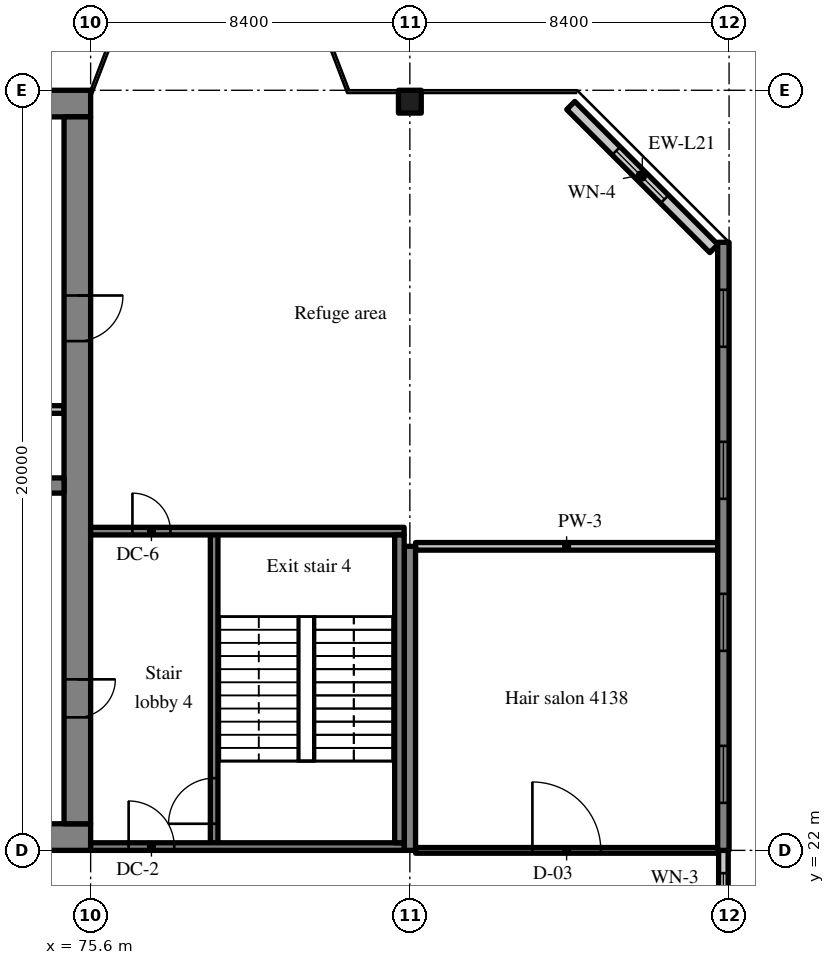
"""IFC4 building model, lengths in metres.
Left out: names, types, materials, properties, quantities, classifications, styles, units other than length and angle.
Written with IfcOpenShell. Run it as: python <this file> out.ifc"""

import sys

from ifc_helpers import new_model, si_unit, direction, frame, frame_2d, origin, origin_2d, place, context, subcontext, project, spatial, rectangle, extrude, source, transform, mapped, element, fill, save


model = new_model("IFC4")
c1 = context("Model", 3, precision=1e-05, world=origin(), true_north=direction((0.0, 1.0)))
c2 = subcontext(c1, "Body", "Model", "MODEL_VIEW")
j1 = project(units=[si_unit("LENGTHUNIT", "METRE"), si_unit("PLANEANGLEUNIT", "RADIAN")], contexts=[c1])
p1 = place(None, origin())
s1 = spatial("IfcSite", under=j1, at=p1, CompositionType="ELEMENT")
p2 = place(p1, origin())
s2 = spatial("IfcBuilding", under=s1, at=p2, CompositionType="ELEMENT")
p3 = place(p2, frame((0.0, 0.0, 170.6)))
s3 = spatial("IfcBuildingStorey", under=s2, at=p3, CompositionType="ELEMENT", Elevation=170.6)
m1 = source(origin(), c2, "Body", "SweptSolid", [
    extrude(rectangle(XDim=50.4, YDim=0.7, at=frame_2d((25.2, 0.0))), origin(), (0.0, 0.0, 1.0), 3.52),
])
p4 = place(p3, frame((25.2, 22.35, 0.0), z_axis=(0.0, 0.0, 1.0), x_axis=(1.0, 0.0, 0.0)))
e1 = element("IfcWall", 1, at=p4, inside=s3, PredefinedType="SHEAR", context=c2, shape_type="MappedRepresentation", body=[
    mapped(m1, transform((0.0, 0.0, 0.0), scale=1.0)),
])
m2 = source(origin(), c2, "Body", "SweptSolid", [
    extrude(rectangle(XDim=1.8, YDim=2.1, at=frame_2d((0.9, 1.05))), frame((0.0, 0.36, 0.0), z_axis=(0.0, -1.0, 0.0), x_axis=(1.0, 0.0, 0.0)), (0.0, 0.0, 1.0), 0.72),
])
p5 = place(p4, frame((15.9, 0.0, 0.0)))
e2 = element("IfcOpeningElement", 2, at=p5, cuts=e1, PredefinedType="OPENING", context=c2, shape_type="MappedRepresentation", body=[
    mapped(m2, transform((0.0, 0.0, 0.0), scale=1.0)),
])
m3 = source(origin(), c2, "Body", "SweptSolid", [
    extrude(rectangle(XDim=0.9, YDim=2.1, at=frame_2d((0.45, 1.05))), frame((0.0, 0.36, 0.0), z_axis=(0.0, -1.0, 0.0), x_axis=(1.0, 0.0, 0.0)), (0.0, 0.0, 1.0), 0.72),
])
p6 = place(p4, frame((9.7, 0.0, 0.0)))
e3 = element("IfcOpeningElement", 3, at=p6, cuts=e1, PredefinedType="OPENING", context=c2, shape_type="MappedRepresentation", body=[
    mapped(m3, transform((0.0, 0.0, 0.0), scale=1.0)),
])
p7 = place(p4, frame((21.5, 0.0, 0.0)))
e4 = element("IfcOpeningElement", 4, at=p7, cuts=e1, PredefinedType="OPENING", context=c2, shape_type="MappedRepresentation", body=[
    mapped(m3, transform((0.0, 0.0, 0.0), scale=1.0)),
])
p8 = place(p4, frame((32.7, 0.0, 0.0)))
e5 = element("IfcOpeningElement", 5, at=p8, cuts=e1, PredefinedType="OPENING", context=c2, shape_type="MappedRepresentation", body=[
    mapped(m2, transform((0.0, 0.0, 0.0), scale=1.0)),
])
m4 = source(origin(), c2, "Body", "SweptSolid", [
    extrude(rectangle(XDim=1.2, YDim=2.1, at=frame_2d((0.6, 1.05))), frame((0.0, 0.36, 0.0), z_axis=(0.0, -1.0, 0.0), x_axis=(1.0, 0.0, 0.0)), (0.0, 0.0, 1.0), 0.72),
])
p9 = place(p4, frame((6.475, 0.0, 0.0)))
e6 = element("IfcOpeningElement", 6, at=p9, cuts=e1, PredefinedType="OPENING", context=c2, shape_type="MappedRepresentation", body=[
    mapped(m4, transform((0.0, 0.0, 0.0), scale=1.0)),
])
p10 = place(p4, frame((47.875, 0.0, 0.0)))
e7 = element("IfcOpeningElement", 7, at=p10, cuts=e1, PredefinedType="OPENING", context=c2, shape_type="MappedRepresentation", body=[
    mapped(m4, transform((0.0, 0.0, 0.0), scale=1.0)),
])
p11 = place(p3, frame((25.2, 41.65, 0.0), z_axis=(0.0, 0.0, 1.0), x_axis=(1.0, 0.0, 0.0)))
e8 = element("IfcWall", 8, at=p11, inside=s3, PredefinedType="SHEAR", context=c2, shape_type="MappedRepresentation", body=[
    mapped(m1, transform((0.0, 0.0, 0.0), scale=1.0)),
])
m5 = source(origin(), c2, "Body", "SweptSolid", [
    extrude(rectangle(XDim=18.6, YDim=0.7, at=frame_2d((9.3, 0.0))), origin(), (0.0, 0.0, 1.0), 3.52),
])
p12 = place(p3, frame((75.25, 22.7, 0.0), z_axis=(0.0, 0.0, 1.0), x_axis=(0.0, 1.0, 0.0)))
e9 = element("IfcWall", 9, at=p12, inside=s3, PredefinedType="SHEAR", context=c2, shape_type="MappedRepresentation", body=[
    mapped(m5, transform((0.0, 0.0, 0.0), scale=1.0)),
])
m6 = source(origin(), c2, "Body", "SweptSolid", [
    extrude(rectangle(XDim=1.0, YDim=2.1, at=frame_2d((0.5, 1.05))), frame((0.0, 0.36, 0.0), z_axis=(0.0, -1.0, 0.0), x_axis=(1.0, 0.0, 0.0)), (0.0, 0.0, 1.0), 0.72),
])
p13 = place(p12, frame((2.8, 0.0, 0.0)))
e10 = element("IfcOpeningElement", 10, at=p13, cuts=e9, PredefinedType="OPENING", context=c2, shape_type="MappedRepresentation", body=[
    mapped(m6, transform((0.0, 0.0, 0.0), scale=1.0)),
])
p14 = place(p12, frame((12.7, 0.0, 0.0)))
e11 = element("IfcOpeningElement", 11, at=p14, cuts=e9, PredefinedType="OPENING", context=c2, shape_type="MappedRepresentation", body=[
    mapped(m4, transform((0.0, 0.0, 0.0), scale=1.0)),
])
m7 = source(origin(), c2, "Body", "SweptSolid", [
    extrude(rectangle(XDim=7.5, YDim=0.4, at=frame_2d((3.75, 0.0))), origin(), (0.0, 0.0, 1.0), 3.52),
])
p15 = place(p3, frame((67.4, 31.6, 0.0), z_axis=(0.0, 0.0, 1.0), x_axis=(1.0, 0.0, 0.0)))
e12 = element("IfcWall", 12, at=p15, inside=s3, PredefinedType="SHEAR", context=c2, shape_type="MappedRepresentation", body=[
    mapped(m7, transform((0.0, 0.0, 0.0), scale=1.0)),
])
m8 = source(origin(), c2, "Body", "SweptSolid", [
    extrude(rectangle(XDim=1.1, YDim=2.1, at=frame_2d((0.55, 1.05))), frame((0.0, 0.21, 0.0), z_axis=(0.0, -1.0, 0.0), x_axis=(1.0, 0.0, 0.0)), (0.0, 0.0, 1.0), 0.42),
])
p16 = place(p15, frame((5.725, 0.0, 0.0)))
e13 = element("IfcOpeningElement", 13, at=p16, cuts=e12, PredefinedType="OPENING", context=c2, shape_type="MappedRepresentation", body=[
    mapped(m8, transform((0.0, 0.0, 0.0), scale=1.0)),
])
m9 = source(origin(), c2, "Body", "SweptSolid", [
    extrude(rectangle(XDim=8.0, YDim=0.3, at=frame_2d((4.0, 0.0))), origin(), (0.0, 0.0, 1.0), 3.52),
])
p17 = place(p3, frame((84.0, 22.0, 0.0), z_axis=(0.0, 0.0, 1.0), x_axis=(0.0, 1.0, 0.0)))
e14 = element("IfcWall", 14, at=p17, inside=s3, PredefinedType="SHEAR", context=c2, shape_type="MappedRepresentation", body=[
    mapped(m9, transform((0.0, 0.0, 0.0), scale=1.0)),
])
m10 = source(origin(), c2, "Body", "SweptSolid", [
    extrude(rectangle(XDim=16.0, YDim=0.3, at=frame_2d((8.0, 0.0))), origin(), (0.0, 0.0, 1.0), 3.52),
])
p18 = place(p3, frame((92.25, 22.0, 0.0), z_axis=(0.0, 0.0, 1.0), x_axis=(0.0, 1.0, 0.0)))
e15 = element("IfcWall", 15, at=p18, inside=s3, PredefinedType="SHEAR", context=c2, shape_type="MappedRepresentation", body=[
    mapped(m10, transform((0.0, 0.0, 0.0), scale=1.0)),
])
m11 = source(origin(), c2, "Body", "SweptSolid", [
    extrude(rectangle(XDim=1.5, YDim=1.5, at=frame_2d((0.75, 0.75))), frame((0.0, 0.16, 0.0), z_axis=(0.0, -1.0, 0.0), x_axis=(1.0, 0.0, 0.0)), (0.0, 0.0, 1.0), 0.32),
])
p19 = place(p18, frame((1.25, 0.0, 0.9)))
e16 = element("IfcOpeningElement", 16, at=p19, cuts=e15, PredefinedType="OPENING", context=c2, shape_type="MappedRepresentation", body=[
    mapped(m11, transform((0.0, 0.0, 0.0), scale=1.0)),
])
p20 = place(p18, frame((5.25, 0.0, 0.9)))
e17 = element("IfcOpeningElement", 17, at=p20, cuts=e15, PredefinedType="OPENING", context=c2, shape_type="MappedRepresentation", body=[
    mapped(m11, transform((0.0, 0.0, 0.0), scale=1.0)),
])
p21 = place(p18, frame((9.25, 0.0, 0.9)))
e18 = element("IfcOpeningElement", 18, at=p21, cuts=e15, PredefinedType="OPENING", context=c2, shape_type="MappedRepresentation", body=[
    mapped(m11, transform((0.0, 0.0, 0.0), scale=1.0)),
])
p22 = place(p18, frame((13.25, 0.0, 0.9)))
e19 = element("IfcOpeningElement", 19, at=p22, cuts=e15, PredefinedType="OPENING", context=c2, shape_type="MappedRepresentation", body=[
    mapped(m11, transform((0.0, 0.0, 0.0), scale=1.0)),
])
m12 = source(origin(), c2, "Body", "SweptSolid", [
    extrude(rectangle(XDim=0.6, YDim=0.6, at=origin_2d()), origin(), (0.0, 0.0, 1.0), 3.52),
])
p23 = place(p3, frame((84.0, 41.7, 0.0), z_axis=(0.0, 0.0, 1.0), x_axis=(1.0, 0.0, 0.0)))
e20 = element("IfcColumn", 20, at=p23, inside=s3, PredefinedType="COLUMN", context=c2, shape_type="MappedRepresentation", body=[
    mapped(m12, transform((0.0, 0.0, 0.0), scale=1.0)),
])
m13 = source(origin(), c2, "Body", "SweptSolid", [
    extrude(rectangle(XDim=5.326, YDim=0.3, at=frame_2d((2.663, 0.0))), origin(), (0.0, 0.0, 1.0), 3.52),
])
p24 = place(p3, frame((92.0, 37.834, 0.0), z_axis=(0.0, 0.0, 1.0), x_axis=(-0.707083859269, 0.707129702361, 0.0)))
e21 = element("IfcWall", 21, at=p24, inside=s3, PredefinedType="SOLIDWALL", context=c2, shape_type="MappedRepresentation", body=[
    mapped(m13, transform((0.0, 0.0, 0.0), scale=1.0)),
])
m14 = source(origin(), c2, "Body", "SweptSolid", [
    extrude(rectangle(XDim=1.8, YDim=1.5, at=frame_2d((0.9, 0.75))), frame((0.0, 0.16, 0.0), z_axis=(0.0, -1.0, 0.0), x_axis=(1.0, 0.0, 0.0)), (0.0, 0.0, 1.0), 0.32),
])
p25 = place(p24, frame((1.836, 0.0, 0.9)))
e22 = element("IfcOpeningElement", 22, at=p25, cuts=e21, PredefinedType="OPENING", context=c2, shape_type="MappedRepresentation", body=[
    mapped(m14, transform((0.0, 0.0, 0.0), scale=1.0)),
])
m15 = source(origin(), c2, "Body", "SweptSolid", [
    extrude(rectangle(XDim=2.4, YDim=0.25, at=frame_2d((1.2, 0.0))), origin(), (0.0, 0.0, 1.0), 2.62),
])
p26 = place(p3, frame((92.25, 19.6, 0.0), z_axis=(0.0, 0.0, 1.0), x_axis=(0.0, 1.0, 0.0)))
e23 = element("IfcWall", 23, at=p26, inside=s3, PredefinedType="SOLIDWALL", context=c2, shape_type="MappedRepresentation", body=[
    mapped(m15, transform((0.0, 0.0, 0.0), scale=1.0)),
])
m16 = source(origin(), c2, "Body", "SweptSolid", [
    extrude(rectangle(XDim=1.2, YDim=1.5, at=frame_2d((0.6, 0.75))), frame((0.0, 0.135, 0.0), z_axis=(0.0, -1.0, 0.0), x_axis=(1.0, 0.0, 0.0)), (0.0, 0.0, 1.0), 0.27),
])
p27 = place(p26, frame((0.6, 0.0, 0.9)))
e24 = element("IfcOpeningElement", 24, at=p27, cuts=e23, PredefinedType="OPENING", context=c2, shape_type="MappedRepresentation", body=[
    mapped(m16, transform((0.0, 0.0, 0.0), scale=1.0)),
])
m17 = source(origin(), c2, "Body", "SweptSolid", [
    extrude(rectangle(XDim=2.45, YDim=0.2, at=frame_2d((1.225, 0.0))), origin(), (0.0, 0.0, 1.0), 3.52),
])
p28 = place(p3, frame((72.45, 33.6, 0.0), z_axis=(0.0, 0.0, 1.0), x_axis=(1.0, 0.0, 0.0)))
e25 = element("IfcWall", 25, at=p28, inside=s3, PredefinedType="SOLIDWALL", context=c2, shape_type="MappedRepresentation", body=[
    mapped(m17, transform((0.0, 0.0, 0.0), scale=1.0)),
])
m18 = source(origin(), c2, "Body", "SweptSolid", [
    extrude(rectangle(XDim=8.3, YDim=0.2, at=frame_2d((4.15, 0.0))), origin(), (0.0, 0.0, 1.0), 3.52),
])
p29 = place(p3, frame((78.85, 22.1, 0.0), z_axis=(0.0, 0.0, 1.0), x_axis=(0.0, 1.0, 0.0)))
e26 = element("IfcWall", 26, at=p29, inside=s3, PredefinedType="SOLIDWALL", context=c2, shape_type="MappedRepresentation", body=[
    mapped(m18, transform((0.0, 0.0, 0.0), scale=1.0)),
])
m19 = source(origin(), c2, "Body", "SweptSolid", [
    extrude(rectangle(XDim=1.2, YDim=2.1, at=frame_2d((0.6, 1.05))), frame((0.0, 0.11, 0.0), z_axis=(0.0, -1.0, 0.0), x_axis=(1.0, 0.0, 0.0)), (0.0, 0.0, 1.0), 0.22),
])
p30 = place(p29, frame((0.6, 0.0, 0.0)))
e27 = element("IfcOpeningElement", 27, at=p30, cuts=e26, PredefinedType="OPENING", context=c2, shape_type="MappedRepresentation", body=[
    mapped(m19, transform((0.0, 0.0, 0.0), scale=1.0)),
])
m20 = source(origin(), c2, "Body", "SweptSolid", [
    extrude(rectangle(XDim=8.25, YDim=0.2, at=frame_2d((4.125, 0.0))), origin(), (0.0, 0.0, 1.0), 3.52),
])
p31 = place(p3, frame((83.85, 22.1, 0.0), z_axis=(0.0, 0.0, 1.0), x_axis=(-1.0, 0.0, 0.0)))
e28 = element("IfcWall", 28, at=p31, inside=s3, PredefinedType="SOLIDWALL", context=c2, shape_type="MappedRepresentation", body=[
    mapped(m20, transform((0.0, 0.0, 0.0), scale=1.0)),
])
p32 = place(p31, frame((6.05, 0.0, 0.0)))
e29 = element("IfcOpeningElement", 29, at=p32, cuts=e28, PredefinedType="OPENING", context=c2, shape_type="MappedRepresentation", body=[
    mapped(m19, transform((0.0, 0.0, 0.0), scale=1.0)),
])
p33 = place(p3, frame((83.85, 30.4, 0.0), z_axis=(0.0, 0.0, 1.0), x_axis=(-1.0, 0.0, 0.0)))
e30 = element("IfcWall", 30, at=p33, inside=s3, PredefinedType="SOLIDWALL", context=c2, shape_type="MappedRepresentation", body=[
    mapped(m20, transform((0.0, 0.0, 0.0), scale=1.0)),
])
m21 = source(origin(), c2, "Body", "SweptSolid", [
    extrude(rectangle(XDim=1.0, YDim=2.1, at=frame_2d((0.5, 1.05))), frame((0.0, 0.11, 0.0), z_axis=(0.0, -1.0, 0.0), x_axis=(1.0, 0.0, 0.0)), (0.0, 0.0, 1.0), 0.22),
])
p34 = place(p33, frame((6.15, 0.0, 0.0)))
e31 = element("IfcOpeningElement", 31, at=p34, cuts=e30, PredefinedType="OPENING", context=c2, shape_type="MappedRepresentation", body=[
    mapped(m21, transform((0.0, 0.0, 0.0), scale=1.0)),
])
m22 = source(origin(), c2, "Body", "SweptSolid", [
    extrude(rectangle(XDim=8.1, YDim=0.25, at=frame_2d((4.05, 0.0))), origin(), (0.0, 0.0, 1.0), 3.52),
])
p35 = place(p3, frame((83.725, 22.2, 0.0), z_axis=(0.0, 0.0, 1.0), x_axis=(0.0, 1.0, 0.0)))
e32 = element("IfcWall", 32, at=p35, inside=s3, PredefinedType="SOLIDWALL", context=c2, shape_type="MappedRepresentation", body=[
    mapped(m22, transform((0.0, 0.0, 0.0), scale=1.0)),
])
m23 = source(origin(), c2, "Body", "SweptSolid", [
    extrude(rectangle(XDim=7.95, YDim=0.15, at=frame_2d((3.975, 0.0))), origin(), (0.0, 0.0, 1.0), 2.82),
])
p36 = place(p3, frame((84.15, 22.0, 0.0), z_axis=(0.0, 0.0, 1.0), x_axis=(1.0, 0.0, 0.0)))
e33 = element("IfcWall", 33, at=p36, inside=s3, PredefinedType="PARTITIONING", context=c2, shape_type="MappedRepresentation", body=[
    mapped(m23, transform((0.0, 0.0, 0.0), scale=1.0)),
])
m24 = source(origin(), c2, "Body", "SweptSolid", [
    extrude(rectangle(XDim=1.8, YDim=2.1, at=frame_2d((0.9, 1.05))), frame((0.0, 0.085, 0.0), z_axis=(0.0, -1.0, 0.0), x_axis=(1.0, 0.0, 0.0)), (0.0, 0.0, 1.0), 0.17),
])
p37 = place(p36, frame((3.075, 0.0, 0.0)))
e34 = element("IfcOpeningElement", 34, at=p37, cuts=e33, PredefinedType="OPENING", context=c2, shape_type="MappedRepresentation", body=[
    mapped(m24, transform((0.0, 0.0, 0.0), scale=1.0)),
])
m25 = source(origin(), c2, "Body", "SweptSolid", [
    extrude(rectangle(XDim=7.95, YDim=0.2, at=frame_2d((3.975, 0.0))), origin(), (0.0, 0.0, 1.0), 3.52),
])
p38 = place(p3, frame((84.15, 30.0, 0.0), z_axis=(0.0, 0.0, 1.0), x_axis=(1.0, 0.0, 0.0)))
e35 = element("IfcWall", 35, at=p38, inside=s3, PredefinedType="PARTITIONING", context=c2, shape_type="MappedRepresentation", body=[
    mapped(m25, transform((0.0, 0.0, 0.0), scale=1.0)),
])
m26 = source(origin(), c2, "Body", "SweptSolid", [
    extrude(rectangle(XDim=1.8, YDim=1.5, at=frame_2d((0.9, 0.75))), frame((0.0, 0.03, 0.0), z_axis=(0.0, -1.0, 0.0), x_axis=(1.0, 0.0, 0.0)), (0.0, 0.0, 1.0), 0.06),
])
p39 = place(p25, origin())
e36 = element("IfcWindow", 36, at=p39, inside=s3, PartitioningType="SINGLE_PANEL", PredefinedType="WINDOW", context=c2, shape_type="MappedRepresentation", body=[
    mapped(m26, transform((0.0, 0.0, 0.0), scale=1.0)),
])
fill(e22, e36)
m27 = source(origin(), c2, "Body", "SweptSolid", [
    extrude(rectangle(XDim=1.5, YDim=1.5, at=frame_2d((0.75, 0.75))), frame((0.0, 0.03, 0.0), z_axis=(0.0, -1.0, 0.0), x_axis=(1.0, 0.0, 0.0)), (0.0, 0.0, 1.0), 0.06),
])
p40 = place(p19, origin())
e37 = element("IfcWindow", 37, at=p40, inside=s3, PartitioningType="SINGLE_PANEL", PredefinedType="WINDOW", context=c2, shape_type="MappedRepresentation", body=[
    mapped(m27, transform((0.0, 0.0, 0.0), scale=1.0)),
])
fill(e16, e37)
p41 = place(p20, origin())
e38 = element("IfcWindow", 38, at=p41, inside=s3, PartitioningType="SINGLE_PANEL", PredefinedType="WINDOW", context=c2, shape_type="MappedRepresentation", body=[
    mapped(m27, transform((0.0, 0.0, 0.0), scale=1.0)),
])
fill(e17, e38)
p42 = place(p21, origin())
e39 = element("IfcWindow", 39, at=p42, inside=s3, PartitioningType="SINGLE_PANEL", PredefinedType="WINDOW", context=c2, shape_type="MappedRepresentation", body=[
    mapped(m27, transform((0.0, 0.0, 0.0), scale=1.0)),
])
fill(e18, e39)
p43 = place(p22, origin())
e40 = element("IfcWindow", 40, at=p43, inside=s3, PartitioningType="SINGLE_PANEL", PredefinedType="WINDOW", context=c2, shape_type="MappedRepresentation", body=[
    mapped(m27, transform((0.0, 0.0, 0.0), scale=1.0)),
])
fill(e19, e40)
m28 = source(origin(), c2, "Body", "SweptSolid", [
    extrude(rectangle(XDim=1.2, YDim=1.5, at=frame_2d((0.6, 0.75))), frame((0.0, 0.03, 0.0), z_axis=(0.0, -1.0, 0.0), x_axis=(1.0, 0.0, 0.0)), (0.0, 0.0, 1.0), 0.06),
])
p44 = place(p27, origin())
e41 = element("IfcWindow", 41, at=p44, inside=s3, PartitioningType="SINGLE_PANEL", PredefinedType="WINDOW", context=c2, shape_type="MappedRepresentation", body=[
    mapped(m28, transform((0.0, 0.0, 0.0), scale=1.0)),
])
fill(e24, e41)
m29 = source(origin(), c2, "Body", "SweptSolid", [
    extrude(rectangle(XDim=1.0, YDim=2.1, at=frame_2d((0.5, 1.05))), frame((0.0, 0.025, 0.0), z_axis=(0.0, -1.0, 0.0), x_axis=(1.0, 0.0, 0.0)), (0.0, 0.0, 1.0), 0.05),
])
p45 = place(p13, origin())
e42 = element("IfcDoor", 42, at=p45, inside=s3, OperationType="SINGLE_SWING_RIGHT", PredefinedType="DOOR", context=c2, shape_type="MappedRepresentation", body=[
    mapped(m29, transform((0.0, 0.0, 0.0), scale=1.0)),
])
fill(e10, e42)
m30 = source(origin(), c2, "Body", "SweptSolid", [
    extrude(rectangle(XDim=1.2, YDim=2.1, at=frame_2d((0.6, 1.05))), frame((0.0, 0.025, 0.0), z_axis=(0.0, -1.0, 0.0), x_axis=(1.0, 0.0, 0.0)), (0.0, 0.0, 1.0), 0.05),
])
p46 = place(p14, origin())
e43 = element("IfcDoor", 43, at=p46, inside=s3, OperationType="SINGLE_SWING_RIGHT", PredefinedType="DOOR", context=c2, shape_type="MappedRepresentation", body=[
    mapped(m30, transform((0.0, 0.0, 0.0), scale=1.0)),
])
fill(e11, e43)
p47 = place(p30, origin())
e44 = element("IfcDoor", 44, at=p47, inside=s3, OperationType="SINGLE_SWING_LEFT", PredefinedType="DOOR", context=c2, shape_type="MappedRepresentation", body=[
    mapped(m30, transform((0.0, 0.0, 0.0), scale=1.0)),
])
fill(e27, e44)
p48 = place(p32, origin())
e45 = element("IfcDoor", 45, at=p48, inside=s3, OperationType="SINGLE_SWING_RIGHT", PredefinedType="DOOR", context=c2, shape_type="MappedRepresentation", body=[
    mapped(m30, transform((0.0, 0.0, 0.0), scale=1.0)),
])
fill(e29, e45)
p49 = place(p34, origin())
e46 = element("IfcDoor", 46, at=p49, inside=s3, OperationType="SINGLE_SWING_RIGHT", PredefinedType="DOOR", context=c2, shape_type="MappedRepresentation", body=[
    mapped(m29, transform((0.0, 0.0, 0.0), scale=1.0)),
])
fill(e31, e46)
m31 = source(origin(), c2, "Body", "SweptSolid", [
    extrude(rectangle(XDim=1.8, YDim=2.1, at=frame_2d((0.9, 1.05))), frame((0.0, 0.025, 0.0), z_axis=(0.0, -1.0, 0.0), x_axis=(1.0, 0.0, 0.0)), (0.0, 0.0, 1.0), 0.05),
])
p50 = place(p37, origin())
e47 = element("IfcDoor", 47, at=p50, inside=s3, OperationType="DOUBLE_DOOR_SINGLE_SWING", PredefinedType="DOOR", context=c2, shape_type="MappedRepresentation", body=[
    mapped(m31, transform((0.0, 0.0, 0.0), scale=1.0)),
])
fill(e34, e47)
save(model, sys.argv[1])
